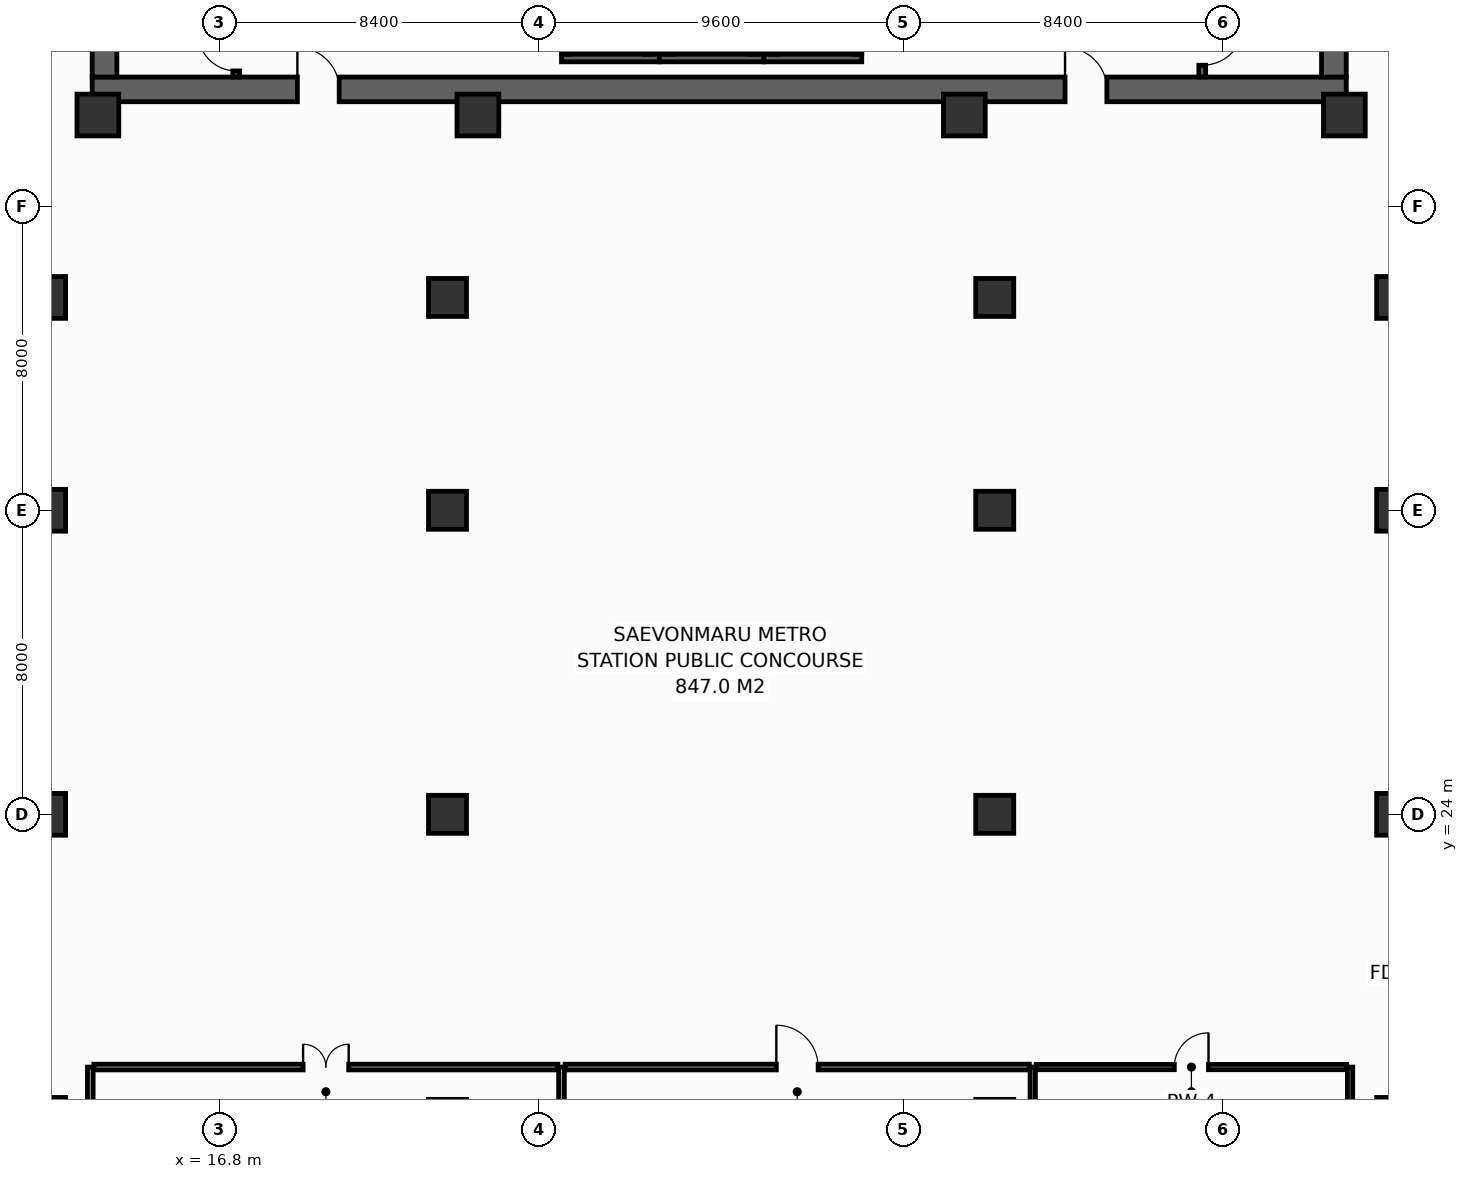
"""IFC4 building model, lengths in metres.
Left out: names, types, materials, properties, quantities, classifications, styles, units other than length and angle.
Written with IfcOpenShell. Run it as: python <this file> out.ifc"""

import sys

from ifc_helpers import new_model, si_unit, direction, frame, frame_2d, origin, origin_2d, place, context, subcontext, project, spatial, rectangle, extrude, element, fill, save


model = new_model("IFC4")
c1 = context("Model", 3, precision=1e-05, world=origin(), true_north=direction((0.0, 1.0)))
c2 = subcontext(c1, "Body", "Model", "MODEL_VIEW")
j1 = project(units=[si_unit("LENGTHUNIT", "METRE"), si_unit("PLANEANGLEUNIT", "RADIAN")], contexts=[c1])
p1 = place(None, origin())
s1 = spatial("IfcSite", under=j1, at=p1, CompositionType="ELEMENT")
p2 = place(p1, origin())
s2 = spatial("IfcBuilding", under=s1, at=p2, CompositionType="ELEMENT")
p3 = place(p2, frame((0.0, 0.0, -5.4)))
s3 = spatial("IfcBuildingStorey", under=s2, at=p3, CompositionType="ELEMENT", Elevation=-5.4)
p4 = place(p3, frame((13.45, 43.075, 0.0), z_axis=(0.0, 0.0, 1.0), x_axis=(1.0, 0.0, 0.0)))
e1 = element("IfcWall", 1, at=p4, inside=s3, PredefinedType="SHEAR", context=c2, shape_type="SweptSolid", body=[
    extrude(rectangle(XDim=33.0, YDim=0.65, at=frame_2d((16.5, 0.0))), origin(), (0.0, 0.0, 1.0), 5.05),
])
p5 = place(p4, frame((5.4, 0.0, 0.0)))
e2 = element("IfcOpeningElement", 2, at=p5, cuts=e1, PredefinedType="OPENING", context=c2, shape_type="SweptSolid", body=[
    extrude(rectangle(XDim=1.1, YDim=2.15, at=frame_2d((0.55, 1.075))), frame((0.0, 0.335, 0.0), z_axis=(0.0, -1.0, 0.0), x_axis=(1.0, 0.0, 0.0)), (0.0, 0.0, 1.0), 0.67),
])
p6 = place(p4, frame((25.6, 0.0, 0.0)))
e3 = element("IfcOpeningElement", 3, at=p6, cuts=e1, PredefinedType="OPENING", context=c2, shape_type="SweptSolid", body=[
    extrude(rectangle(XDim=1.1, YDim=2.15, at=frame_2d((0.55, 1.075))), frame((0.0, 0.335, 0.0), z_axis=(0.0, -1.0, 0.0), x_axis=(1.0, 0.0, 0.0)), (0.0, 0.0, 1.0), 0.67),
])
for number, where, z_axis, x_axis in (
    (4, (13.775, 43.4, 0.0), (0.0, 0.0, 1.0), (0.0, 1.0, 0.0)),
    (5, (46.125, 43.4, 0.0), (0.0, 0.0, 1.0), (0.0, 1.0, 0.0)),
):
    element("IfcWall", number, at=place(p3, frame(where, z_axis=z_axis, x_axis=x_axis)), inside=s3, PredefinedType="SHEAR", context=c2, shape_type="SweptSolid", body=[
        extrude(rectangle(XDim=10.4, YDim=0.65, at=frame_2d((5.2, 0.0))), origin(), (0.0, 0.0, 1.0), 5.05),
    ])
for number, where, z_axis, x_axis in (
    (6, (13.6, 42.4, 0.0), (0.0, 0.0, 1.0), (1.0, 0.0, 0.0)),
    (7, (23.6, 42.4, 0.0), (0.0, 0.0, 1.0), (1.0, 0.0, 0.0)),
    (8, (36.4, 42.4, 0.0), (0.0, 0.0, 1.0), (1.0, 0.0, 0.0)),
    (9, (46.4, 42.4, 0.0), (0.0, 0.0, 1.0), (1.0, 0.0, 0.0)),
    (10, (12.2, 16.0, 0.0), (0.0, 0.0, 1.0), (1.0, 0.0, 0.0)),
    (11, (47.8, 16.0, 0.0), (0.0, 0.0, 1.0), (1.0, 0.0, 0.0)),
    (12, (12.2, 24.0, 0.0), (0.0, 0.0, 1.0), (1.0, 0.0, 0.0)),
):
    element("IfcColumn", number, at=place(p3, frame(where, z_axis=z_axis, x_axis=x_axis)), inside=s3, PredefinedType="COLUMN", context=c2, shape_type="SweptSolid", body=[
        extrude(rectangle(XDim=1.1, YDim=1.1, at=origin_2d()), origin(), (0.0, 0.0, 1.0), 5.4),
    ])
for number, where, z_axis, x_axis in (
    (13, (22.8, 24.0, 0.0), (0.0, 0.0, 1.0), (1.0, 0.0, 0.0)),
    (14, (37.2, 24.0, 0.0), (0.0, 0.0, 1.0), (1.0, 0.0, 0.0)),
):
    element("IfcColumn", number, at=place(p3, frame(where, z_axis=z_axis, x_axis=x_axis)), inside=s3, PredefinedType="COLUMN", context=c2, shape_type="SweptSolid", body=[
        extrude(rectangle(XDim=1.0, YDim=1.0, at=origin_2d()), origin(), (0.0, 0.0, 1.0), 5.4),
    ])
for number, where, z_axis, x_axis in (
    (15, (47.8, 24.0, 0.0), (0.0, 0.0, 1.0), (1.0, 0.0, 0.0)),
    (16, (12.2, 32.0, 0.0), (0.0, 0.0, 1.0), (1.0, 0.0, 0.0)),
):
    element("IfcColumn", number, at=place(p3, frame(where, z_axis=z_axis, x_axis=x_axis)), inside=s3, PredefinedType="COLUMN", context=c2, shape_type="SweptSolid", body=[
        extrude(rectangle(XDim=1.1, YDim=1.1, at=origin_2d()), origin(), (0.0, 0.0, 1.0), 5.4),
    ])
for number, where, z_axis, x_axis in (
    (17, (22.8, 32.0, 0.0), (0.0, 0.0, 1.0), (1.0, 0.0, 0.0)),
    (18, (37.2, 32.0, 0.0), (0.0, 0.0, 1.0), (1.0, 0.0, 0.0)),
):
    element("IfcColumn", number, at=place(p3, frame(where, z_axis=z_axis, x_axis=x_axis)), inside=s3, PredefinedType="COLUMN", context=c2, shape_type="SweptSolid", body=[
        extrude(rectangle(XDim=1.0, YDim=1.0, at=origin_2d()), origin(), (0.0, 0.0, 1.0), 5.4),
    ])
for number, where, z_axis, x_axis in (
    (19, (47.8, 32.0, 0.0), (0.0, 0.0, 1.0), (1.0, 0.0, 0.0)),
    (20, (12.2, 37.6, 0.0), (0.0, 0.0, 1.0), (1.0, 0.0, 0.0)),
):
    element("IfcColumn", number, at=place(p3, frame(where, z_axis=z_axis, x_axis=x_axis)), inside=s3, PredefinedType="COLUMN", context=c2, shape_type="SweptSolid", body=[
        extrude(rectangle(XDim=1.1, YDim=1.1, at=origin_2d()), origin(), (0.0, 0.0, 1.0), 5.4),
    ])
for number, where, z_axis, x_axis in (
    (21, (22.8, 37.6, 0.0), (0.0, 0.0, 1.0), (1.0, 0.0, 0.0)),
    (22, (37.2, 37.6, 0.0), (0.0, 0.0, 1.0), (1.0, 0.0, 0.0)),
):
    element("IfcColumn", number, at=place(p3, frame(where, z_axis=z_axis, x_axis=x_axis)), inside=s3, PredefinedType="COLUMN", context=c2, shape_type="SweptSolid", body=[
        extrude(rectangle(XDim=1.0, YDim=1.0, at=origin_2d()), origin(), (0.0, 0.0, 1.0), 5.4),
    ])
p7 = place(p3, frame((47.8, 37.6, 0.0), z_axis=(0.0, 0.0, 1.0), x_axis=(1.0, 0.0, 0.0)))
e23 = element("IfcColumn", 23, at=p7, inside=s3, PredefinedType="COLUMN", context=c2, shape_type="SweptSolid", body=[
    extrude(rectangle(XDim=1.1, YDim=1.1, at=origin_2d()), origin(), (0.0, 0.0, 1.0), 5.4),
])
p8 = place(p3, frame((25.8, 43.9, 0.0), z_axis=(0.0, 0.0, 1.0), x_axis=(1.0, 0.0, 0.0)))
e24 = element("IfcWall", 24, at=p8, inside=s3, PredefinedType="SHEAR", context=c2, shape_type="SweptSolid", body=[
    extrude(rectangle(XDim=2.575, YDim=0.2, at=frame_2d((1.288, 0.0))), origin(), (0.0, 0.0, 1.0), 5.05),
])
for number, where, z_axis, x_axis in (
    (25, (25.9, 44.0, 0.0), (0.0, 0.0, 1.0), (0.0, 1.0, 0.0)),
    (26, (28.1, 44.0, 0.0), (0.0, 0.0, 1.0), (0.0, 1.0, 0.0)),
):
    element("IfcWall", number, at=place(p3, frame(where, z_axis=z_axis, x_axis=x_axis)), inside=s3, PredefinedType="SHEAR", context=c2, shape_type="SweptSolid", body=[
        extrude(rectangle(XDim=2.3, YDim=0.2, at=frame_2d((1.15, 0.0))), origin(), (0.0, 0.0, 1.0), 5.05),
    ])
p9 = place(p3, frame((28.375, 43.9, 0.0), z_axis=(0.0, 0.0, 1.0), x_axis=(1.0, 0.0, 0.0)))
e27 = element("IfcWall", 27, at=p9, inside=s3, PredefinedType="SHEAR", context=c2, shape_type="SweptSolid", body=[
    extrude(rectangle(XDim=2.75, YDim=0.2, at=frame_2d((1.375, 0.0))), origin(), (0.0, 0.0, 1.0), 5.05),
])
for number, where, z_axis, x_axis in (
    (28, (28.65, 44.0, 0.0), (0.0, 0.0, 1.0), (0.0, 1.0, 0.0)),
    (29, (30.85, 44.0, 0.0), (0.0, 0.0, 1.0), (0.0, 1.0, 0.0)),
):
    element("IfcWall", number, at=place(p3, frame(where, z_axis=z_axis, x_axis=x_axis)), inside=s3, PredefinedType="SHEAR", context=c2, shape_type="SweptSolid", body=[
        extrude(rectangle(XDim=2.3, YDim=0.2, at=frame_2d((1.15, 0.0))), origin(), (0.0, 0.0, 1.0), 5.05),
    ])
p10 = place(p3, frame((31.125, 43.9, 0.0), z_axis=(0.0, 0.0, 1.0), x_axis=(1.0, 0.0, 0.0)))
e30 = element("IfcWall", 30, at=p10, inside=s3, PredefinedType="SHEAR", context=c2, shape_type="SweptSolid", body=[
    extrude(rectangle(XDim=2.575, YDim=0.2, at=frame_2d((1.288, 0.0))), origin(), (0.0, 0.0, 1.0), 5.05),
])
for number, where, z_axis, x_axis in (
    (31, (31.4, 44.0, 0.0), (0.0, 0.0, 1.0), (0.0, 1.0, 0.0)),
    (32, (33.6, 44.0, 0.0), (0.0, 0.0, 1.0), (0.0, 1.0, 0.0)),
):
    element("IfcWall", number, at=place(p3, frame(where, z_axis=z_axis, x_axis=x_axis)), inside=s3, PredefinedType="SHEAR", context=c2, shape_type="SweptSolid", body=[
        extrude(rectangle(XDim=2.3, YDim=0.2, at=frame_2d((1.15, 0.0))), origin(), (0.0, 0.0, 1.0), 5.05),
    ])
p11 = place(p3, frame((17.24, 43.4, 0.0), z_axis=(0.0, 0.0, 1.0), x_axis=(0.0, 1.0, 0.0)))
e33 = element("IfcWall", 33, at=p11, inside=s3, PredefinedType="SHEAR", context=c2, shape_type="SweptSolid", body=[
    extrude(rectangle(XDim=10.4, YDim=0.18, at=frame_2d((5.2, 0.0))), origin(), (0.0, 0.0, 1.0), 5.05),
])
p12 = place(p11, frame((0.16, 0.0, 0.0)))
e34 = element("IfcOpeningElement", 34, at=p12, cuts=e33, PredefinedType="OPENING", context=c2, shape_type="SweptSolid", body=[
    extrude(rectangle(XDim=1.0, YDim=2.15, at=frame_2d((0.5, 1.075))), frame((0.0, 0.1, 0.0), z_axis=(0.0, -1.0, 0.0), x_axis=(1.0, 0.0, 0.0)), (0.0, 0.0, 1.0), 0.2),
])
p13 = place(p3, frame((42.66, 53.8, 0.0), z_axis=(0.0, 0.0, 1.0), x_axis=(0.0, -1.0, 0.0)))
e35 = element("IfcWall", 35, at=p13, inside=s3, PredefinedType="SHEAR", context=c2, shape_type="SweptSolid", body=[
    extrude(rectangle(XDim=10.4, YDim=0.18, at=frame_2d((5.2, 0.0))), origin(), (0.0, 0.0, 1.0), 5.05),
])
p14 = place(p13, frame((8.99, 0.0, 0.0)))
e36 = element("IfcOpeningElement", 36, at=p14, cuts=e35, PredefinedType="OPENING", context=c2, shape_type="SweptSolid", body=[
    extrude(rectangle(XDim=1.1, YDim=2.15, at=frame_2d((0.55, 1.075))), frame((0.0, 0.1, 0.0), z_axis=(0.0, -1.0, 0.0), x_axis=(1.0, 0.0, 0.0)), (0.0, 0.0, 1.0), 0.2),
])
for number, where, z_axis, x_axis in (
    (37, (13.4, 12.895, 0.0), (0.0, 0.0, 1.0), (0.0, 1.0, 0.0)),
    (38, (25.8, 12.895, 0.0), (0.0, 0.0, 1.0), (0.0, 1.0, 0.0)),
):
    element("IfcWall", number, at=place(p3, frame(where, z_axis=z_axis, x_axis=x_axis)), inside=s3, PredefinedType="PARTITIONING", context=c2, shape_type="SweptSolid", body=[
        extrude(rectangle(XDim=4.455, YDim=0.15, at=frame_2d((2.228, 0.0))), origin(), (0.0, 0.0, 1.0), 4.135),
    ])
for number, where, z_axis, x_axis in (
    (39, (38.2, 12.895, 0.0), (0.0, 0.0, 1.0), (0.0, 1.0, 0.0)),
    (40, (46.55, 12.895, 0.0), (0.0, 0.0, 1.0), (0.0, 1.0, 0.0)),
):
    element("IfcWall", number, at=place(p3, frame(where, z_axis=z_axis, x_axis=x_axis)), inside=s3, PredefinedType="PARTITIONING", context=c2, shape_type="SweptSolid", body=[
        extrude(rectangle(XDim=4.455, YDim=0.14, at=frame_2d((2.228, 0.0))), origin(), (0.0, 0.0, 1.0), 4.135),
    ])
p15 = place(p3, frame((13.495, 17.35, 0.0), z_axis=(0.0, 0.0, 1.0), x_axis=(1.0, 0.0, 0.0)))
e41 = element("IfcWall", 41, at=p15, inside=s3, PredefinedType="PARTITIONING", context=c2, shape_type="SweptSolid", body=[
    extrude(rectangle(XDim=12.21, YDim=0.15, at=frame_2d((6.105, 0.0))), origin(), (0.0, 0.0, 1.0), 4.135),
])
p16 = place(p15, frame((5.505, 0.0, 0.0)))
e42 = element("IfcOpeningElement", 42, at=p16, cuts=e41, PredefinedType="OPENING", context=c2, shape_type="SweptSolid", body=[
    extrude(rectangle(XDim=1.2, YDim=2.15, at=frame_2d((0.6, 1.075))), frame((0.0, 0.085, 0.0), z_axis=(0.0, -1.0, 0.0), x_axis=(1.0, 0.0, 0.0)), (0.0, 0.0, 1.0), 0.17),
])
p17 = place(p3, frame((25.895, 17.35, 0.0), z_axis=(0.0, 0.0, 1.0), x_axis=(1.0, 0.0, 0.0)))
e43 = element("IfcWall", 43, at=p17, inside=s3, PredefinedType="PARTITIONING", context=c2, shape_type="SweptSolid", body=[
    extrude(rectangle(XDim=12.215, YDim=0.15, at=frame_2d((6.107, 0.0))), origin(), (0.0, 0.0, 1.0), 4.135),
])
p18 = place(p17, frame((5.558, 0.0, 0.0)))
e44 = element("IfcOpeningElement", 44, at=p18, cuts=e43, PredefinedType="OPENING", context=c2, shape_type="SweptSolid", body=[
    extrude(rectangle(XDim=1.1, YDim=2.15, at=frame_2d((0.55, 1.075))), frame((0.0, 0.085, 0.0), z_axis=(0.0, -1.0, 0.0), x_axis=(1.0, 0.0, 0.0)), (0.0, 0.0, 1.0), 0.17),
])
p19 = place(p3, frame((38.29, 17.35, 0.0), z_axis=(0.0, 0.0, 1.0), x_axis=(1.0, 0.0, 0.0)))
e45 = element("IfcWall", 45, at=p19, inside=s3, PredefinedType="PARTITIONING", context=c2, shape_type="SweptSolid", body=[
    extrude(rectangle(XDim=8.17, YDim=0.14, at=frame_2d((4.085, 0.0))), origin(), (0.0, 0.0, 1.0), 5.05),
])
p20 = place(p19, frame((3.635, 0.0, 0.0)))
e46 = element("IfcOpeningElement", 46, at=p20, cuts=e45, PredefinedType="OPENING", context=c2, shape_type="SweptSolid", body=[
    extrude(rectangle(XDim=0.9, YDim=2.1, at=frame_2d((0.45, 1.05))), frame((0.0, 0.08, 0.0), z_axis=(0.0, -1.0, 0.0), x_axis=(1.0, 0.0, 0.0)), (0.0, 0.0, 1.0), 0.16),
])
p21 = place(p12, origin())
e47 = element("IfcDoor", 47, at=p21, inside=s3, OperationType="SINGLE_SWING_RIGHT", PredefinedType="DOOR", context=c2, shape_type="SweptSolid", body=[
    extrude(rectangle(XDim=1.0, YDim=2.15, at=frame_2d((0.5, 1.075))), frame((0.0, 0.025, 0.0), z_axis=(0.0, -1.0, 0.0), x_axis=(1.0, 0.0, 0.0)), (0.0, 0.0, 1.0), 0.05),
])
fill(e34, e47)
p22 = place(p14, origin())
e48 = element("IfcDoor", 48, at=p22, inside=s3, OperationType="SINGLE_SWING_LEFT", PredefinedType="DOOR", context=c2, shape_type="SweptSolid", body=[
    extrude(rectangle(XDim=1.1, YDim=2.15, at=frame_2d((0.55, 1.075))), frame((0.0, 0.025, 0.0), z_axis=(0.0, -1.0, 0.0), x_axis=(1.0, 0.0, 0.0)), (0.0, 0.0, 1.0), 0.05),
])
fill(e36, e48)
p23 = place(p5, origin())
e49 = element("IfcDoor", 49, at=p23, inside=s3, OperationType="SINGLE_SWING_LEFT", PredefinedType="DOOR", context=c2, shape_type="SweptSolid", body=[
    extrude(rectangle(XDim=1.1, YDim=2.15, at=frame_2d((0.55, 1.075))), frame((0.0, 0.025, 0.0), z_axis=(0.0, -1.0, 0.0), x_axis=(1.0, 0.0, 0.0)), (0.0, 0.0, 1.0), 0.05),
])
fill(e2, e49)
p24 = place(p6, origin())
e50 = element("IfcDoor", 50, at=p24, inside=s3, OperationType="SINGLE_SWING_LEFT", PredefinedType="DOOR", context=c2, shape_type="SweptSolid", body=[
    extrude(rectangle(XDim=1.1, YDim=2.15, at=frame_2d((0.55, 1.075))), frame((0.0, 0.025, 0.0), z_axis=(0.0, -1.0, 0.0), x_axis=(1.0, 0.0, 0.0)), (0.0, 0.0, 1.0), 0.05),
])
fill(e3, e50)
p25 = place(p16, origin())
e51 = element("IfcDoor", 51, at=p25, inside=s3, OperationType="DOUBLE_DOOR_SINGLE_SWING", PredefinedType="DOOR", context=c2, shape_type="SweptSolid", body=[
    extrude(rectangle(XDim=1.2, YDim=2.15, at=frame_2d((0.6, 1.075))), frame((0.0, 0.025, 0.0), z_axis=(0.0, -1.0, 0.0), x_axis=(1.0, 0.0, 0.0)), (0.0, 0.0, 1.0), 0.05),
])
fill(e42, e51)
p26 = place(p18, origin())
e52 = element("IfcDoor", 52, at=p26, inside=s3, OperationType="SINGLE_SWING_LEFT", PredefinedType="DOOR", context=c2, shape_type="SweptSolid", body=[
    extrude(rectangle(XDim=1.1, YDim=2.15, at=frame_2d((0.55, 1.075))), frame((0.0, 0.025, 0.0), z_axis=(0.0, -1.0, 0.0), x_axis=(1.0, 0.0, 0.0)), (0.0, 0.0, 1.0), 0.05),
])
fill(e44, e52)
p27 = place(p20, origin())
e53 = element("IfcDoor", 53, at=p27, inside=s3, OperationType="SINGLE_SWING_RIGHT", PredefinedType="DOOR", context=c2, shape_type="SweptSolid", body=[
    extrude(rectangle(XDim=0.9, YDim=2.1, at=frame_2d((0.45, 1.05))), frame((0.0, 0.025, 0.0), z_axis=(0.0, -1.0, 0.0), x_axis=(1.0, 0.0, 0.0)), (0.0, 0.0, 1.0), 0.05),
])
fill(e46, e53)
save(model, sys.argv[1])
